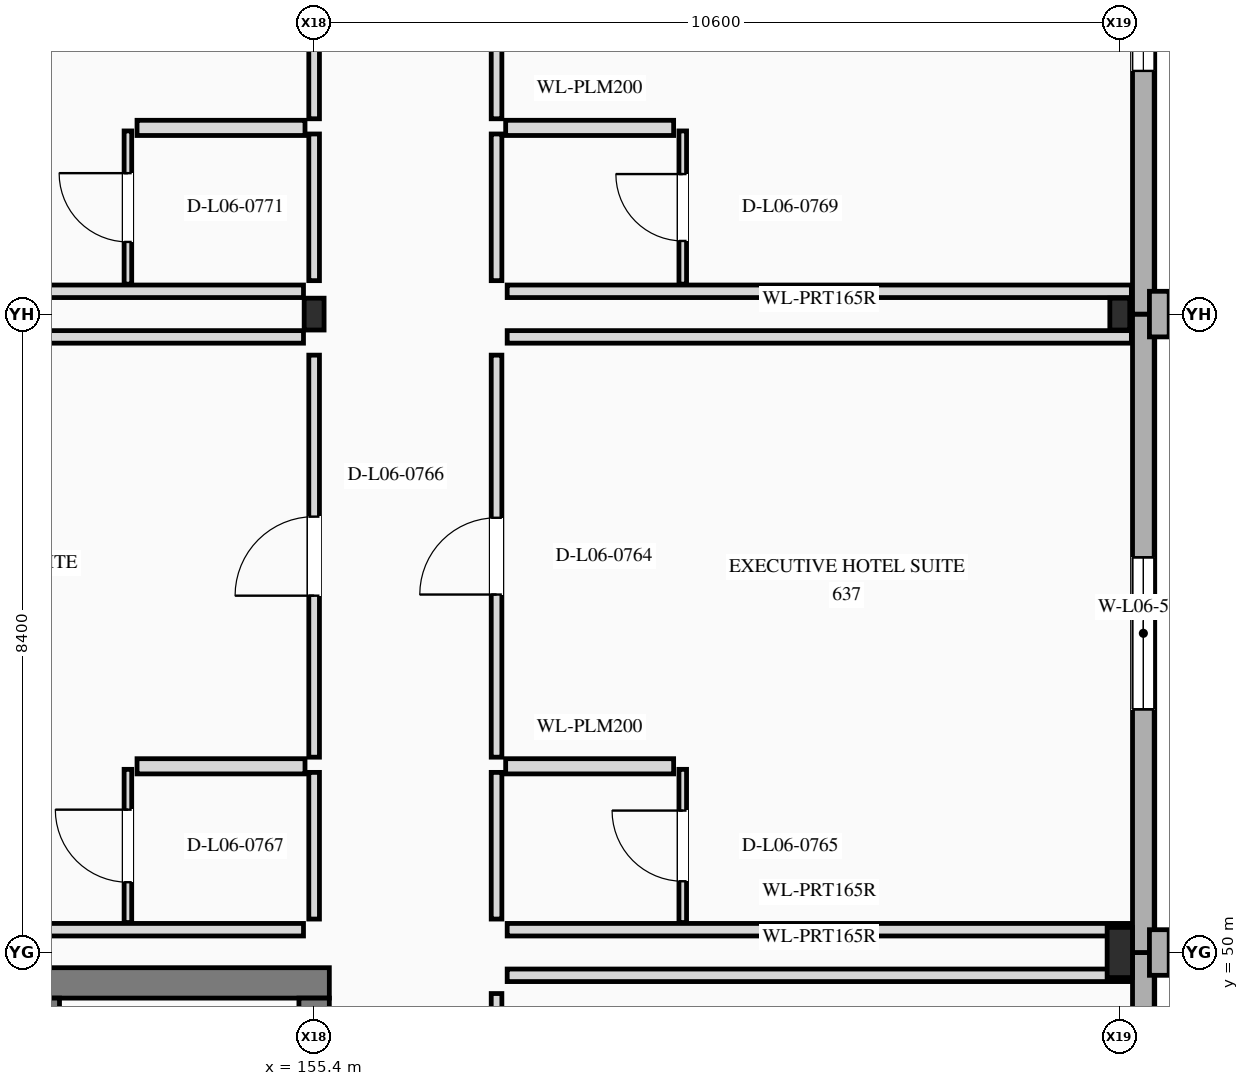
"""IFC4 building model, lengths in metres.
Left out: names, types, materials, properties, quantities, classifications, styles, units other than length and angle.
Written with IfcOpenShell. Run it as: python <this file> out.ifc"""

import sys

from ifc_helpers import new_model, si_unit, direction, frame, frame_2d, origin, origin_2d, place, context, subcontext, project, spatial, rectangle, i_section, extrude, element, fill, save


model = new_model("IFC4")
c1 = context("Model", 3, precision=1e-05, world=origin(), true_north=direction((0.0, 1.0)))
c2 = subcontext(c1, "Body", "Model", "MODEL_VIEW")
j1 = project(units=[si_unit("LENGTHUNIT", "METRE"), si_unit("PLANEANGLEUNIT", "RADIAN")], contexts=[c1])
p1 = place(None, origin())
s1 = spatial("IfcSite", under=j1, at=p1, CompositionType="ELEMENT")
p2 = place(p1, origin())
s2 = spatial("IfcBuilding", under=s1, at=p2, CompositionType="ELEMENT")
p3 = place(p2, frame((0.0, 0.0, 27.0)))
s3 = spatial("IfcBuildingStorey", under=s2, at=p3, CompositionType="ELEMENT", Elevation=27.0)
p4 = place(p3, frame((155.4, 58.4, 0.0), z_axis=(0.0, 0.0, 1.0), x_axis=(1.0, 0.0, 0.0)))
e1 = element("IfcColumn", 1, at=p4, inside=s3, PredefinedType="COLUMN", context=c2, shape_type="SweptSolid", body=[
    extrude(i_section(OverallWidth=0.262, OverallDepth=0.419, WebThickness=0.012, FlangeThickness=0.019, at=origin_2d()), origin(), (0.0, 0.0, 1.0), 3.6),
])
p5 = place(p3, frame((166.0, 50.0, 0.0), z_axis=(0.0, 0.0, 1.0), x_axis=(1.0, 0.0, 0.0)))
e2 = element("IfcColumn", 2, at=p5, inside=s3, PredefinedType="COLUMN", context=c2, shape_type="SweptSolid", body=[
    extrude(i_section(OverallWidth=0.333, OverallDepth=0.66, WebThickness=0.024, FlangeThickness=0.044, at=origin_2d()), origin(), (0.0, 0.0, 1.0), 3.6),
])
p6 = place(p3, frame((166.0, 58.4, 0.0), z_axis=(0.0, 0.0, 1.0), x_axis=(1.0, 0.0, 0.0)))
e3 = element("IfcColumn", 3, at=p6, inside=s3, PredefinedType="COLUMN", context=c2, shape_type="SweptSolid", body=[
    extrude(i_section(OverallWidth=0.262, OverallDepth=0.419, WebThickness=0.012, FlangeThickness=0.019, at=origin_2d()), origin(), (0.0, 0.0, 1.0), 3.6),
])
p7 = place(p3, frame((166.31, 47.86, 0.0), z_axis=(0.0, 0.0, 1.0), x_axis=(0.0, 1.0, 0.0)))
e4 = element("IfcWall", 4, at=p7, inside=s3, PredefinedType="STANDARD", context=c2, shape_type="SweptSolid", body=[
    extrude(rectangle(XDim=2.14, YDim=0.285, at=frame_2d((1.07, 0.0))), origin(), (0.0, 0.0, 1.0), 3.6),
])
p8 = place(p3, frame((166.31, 50.0, 0.0), z_axis=(0.0, 0.0, 1.0), x_axis=(0.0, 1.0, 0.0)))
e5 = element("IfcWall", 5, at=p8, inside=s3, PredefinedType="STANDARD", context=c2, shape_type="SweptSolid", body=[
    extrude(rectangle(XDim=8.4, YDim=0.285, at=frame_2d((4.2, 0.0))), origin(), (0.0, 0.0, 1.0), 3.6),
])
p9 = place(p8, frame((3.2, 0.0, 0.85)))
e6 = element("IfcOpeningElement", 6, at=p9, cuts=e5, PredefinedType="OPENING", context=c2, shape_type="SweptSolid", body=[
    extrude(rectangle(XDim=2.0, YDim=1.65, at=frame_2d((1.0, 0.825))), frame((0.0, 0.152, 0.0), z_axis=(0.0, -1.0, 0.0), x_axis=(1.0, 0.0, 0.0)), (0.0, 0.0, 1.0), 0.305),
])
p10 = place(p3, frame((166.52, 49.7, 0.0), z_axis=(0.0, 0.0, 1.0), x_axis=(0.0, 1.0, 0.0)))
e7 = element("IfcWall", 7, at=p10, inside=s3, PredefinedType="ELEMENTEDWALL", context=c2, shape_type="SweptSolid", body=[
    extrude(rectangle(XDim=0.6, YDim=0.26, at=frame_2d((0.3, 0.0))), origin(), (0.0, 0.0, 1.0), 3.6),
])
p11 = place(p3, frame((166.31, 58.4, 0.0), z_axis=(0.0, 0.0, 1.0), x_axis=(0.0, 1.0, 0.0)))
e8 = element("IfcWall", 8, at=p11, inside=s3, PredefinedType="STANDARD", context=c2, shape_type="SweptSolid", body=[
    extrude(rectangle(XDim=8.71, YDim=0.285, at=frame_2d((4.355, 0.0))), origin(), (0.0, 0.0, 1.0), 3.6),
])
p12 = place(p11, frame((3.2, 0.0, 0.85)))
e9 = element("IfcOpeningElement", 9, at=p12, cuts=e8, PredefinedType="OPENING", context=c2, shape_type="SweptSolid", body=[
    extrude(rectangle(XDim=2.0, YDim=1.65, at=frame_2d((1.0, 0.825))), frame((0.0, 0.152, 0.0), z_axis=(0.0, -1.0, 0.0), x_axis=(1.0, 0.0, 0.0)), (0.0, 0.0, 1.0), 0.305),
])
p13 = place(p3, frame((166.52, 58.1, 0.0), z_axis=(0.0, 0.0, 1.0), x_axis=(0.0, 1.0, 0.0)))
e10 = element("IfcWall", 10, at=p13, inside=s3, PredefinedType="ELEMENTEDWALL", context=c2, shape_type="SweptSolid", body=[
    extrude(rectangle(XDim=0.6, YDim=0.26, at=frame_2d((0.3, 0.0))), origin(), (0.0, 0.0, 1.0), 3.6),
])
p14 = place(p3, frame((155.6, 49.6, 0.0), z_axis=(0.0, 0.0, 1.0), x_axis=(-1.0, 0.0, 0.0)))
e11 = element("IfcWall", 11, at=p14, inside=s3, PredefinedType="SHEAR", context=c2, shape_type="SweptSolid", body=[
    extrude(rectangle(XDim=8.2, YDim=0.4, at=frame_2d((4.1, 0.0))), origin(), (0.0, 0.0, 1.0), 3.6),
])
p15 = place(p3, frame((155.4, 40.0, 0.0), z_axis=(0.0, 0.0, 1.0), x_axis=(0.0, 1.0, 0.0)))
e12 = element("IfcWall", 12, at=p15, inside=s3, PredefinedType="SHEAR", context=c2, shape_type="SweptSolid", body=[
    extrude(rectangle(XDim=9.4, YDim=0.4, at=frame_2d((4.7, 0.0))), origin(), (0.0, 0.0, 1.0), 3.6),
])
p16 = place(p15, frame((1.05, 0.0, 0.0)))
e13 = element("IfcOpeningElement", 13, at=p16, cuts=e12, PredefinedType="OPENING", context=c2, shape_type="SweptSolid", body=[
    extrude(rectangle(XDim=1.1, YDim=2.2, at=frame_2d((0.55, 1.1))), frame((0.0, 0.21, 0.0), z_axis=(0.0, -1.0, 0.0), x_axis=(1.0, 0.0, 0.0)), (0.0, 0.0, 1.0), 0.42),
])
p17 = place(p15, frame((3.95, 0.0, 0.0)))
e14 = element("IfcOpeningElement", 14, at=p17, cuts=e12, PredefinedType="OPENING", context=c2, shape_type="SweptSolid", body=[
    extrude(rectangle(XDim=1.1, YDim=2.2, at=frame_2d((0.55, 1.1))), frame((0.0, 0.21, 0.0), z_axis=(0.0, -1.0, 0.0), x_axis=(1.0, 0.0, 0.0)), (0.0, 0.0, 1.0), 0.42),
])
p18 = place(p15, frame((6.875, 0.0, 0.0)))
e15 = element("IfcOpeningElement", 15, at=p18, cuts=e12, PredefinedType="OPENING", context=c2, shape_type="SweptSolid", body=[
    extrude(rectangle(XDim=1.35, YDim=2.3, at=frame_2d((0.675, 1.15))), frame((0.0, 0.21, 0.0), z_axis=(0.0, -1.0, 0.0), x_axis=(1.0, 0.0, 0.0)), (0.0, 0.0, 1.0), 0.42),
])
p19 = place(p3, frame((151.875, 40.0, 0.0), z_axis=(0.0, 0.0, 1.0), x_axis=(0.0, 1.0, 0.0)))
e16 = element("IfcWall", 16, at=p19, inside=s3, PredefinedType="SHEAR", context=c2, shape_type="SweptSolid", body=[
    extrude(rectangle(XDim=9.4, YDim=0.35, at=frame_2d((4.7, 0.0))), origin(), (0.0, 0.0, 1.0), 3.6),
])
p20 = place(p3, frame((157.8, 44.17, 0.0), z_axis=(0.0, 0.0, 1.0), x_axis=(0.0, 1.0, 0.0)))
e17 = element("IfcWall", 17, at=p20, inside=s3, PredefinedType="PARTITIONING", context=c2, shape_type="SweptSolid", body=[
    extrude(rectangle(XDim=5.29, YDim=0.14, at=frame_2d((2.645, 0.0))), origin(), (0.0, 0.0, 1.0), 3.29),
])
p21 = place(p20, frame((2.155, 0.0, 0.0)))
e18 = element("IfcOpeningElement", 18, at=p21, cuts=e17, PredefinedType="OPENING", context=c2, shape_type="SweptSolid", body=[
    extrude(rectangle(XDim=0.98, YDim=2.35, at=frame_2d((0.49, 1.175))), frame((0.0, 0.08, 0.0), z_axis=(0.0, -1.0, 0.0), x_axis=(1.0, 0.0, 0.0)), (0.0, 0.0, 1.0), 0.16),
])
p22 = place(p3, frame((157.94, 49.7, 0.0), z_axis=(0.0, 0.0, 1.0), x_axis=(1.0, 0.0, 0.0)))
e19 = element("IfcWall", 19, at=p22, inside=s3, PredefinedType="PARTITIONING", context=c2, shape_type="SweptSolid", body=[
    extrude(rectangle(XDim=8.213, YDim=0.165, at=frame_2d((4.106, 0.0))), origin(), (0.0, 0.0, 1.0), 2.68),
])
p23 = place(p3, frame((157.8, 50.44, 0.0), z_axis=(0.0, 0.0, 1.0), x_axis=(0.0, 1.0, 0.0)))
e20 = element("IfcWall", 20, at=p23, inside=s3, PredefinedType="PARTITIONING", context=c2, shape_type="SweptSolid", body=[
    extrude(rectangle(XDim=1.93, YDim=0.14, at=frame_2d((0.965, 0.0))), origin(), (0.0, 0.0, 1.0), 2.843),
])
p24 = place(p3, frame((157.8, 52.57, 0.0), z_axis=(0.0, 0.0, 1.0), x_axis=(0.0, 1.0, 0.0)))
e21 = element("IfcWall", 21, at=p24, inside=s3, PredefinedType="PARTITIONING", context=c2, shape_type="SweptSolid", body=[
    extrude(rectangle(XDim=5.29, YDim=0.14, at=frame_2d((2.645, 0.0))), origin(), (0.0, 0.0, 1.0), 2.843),
])
p25 = place(p24, frame((2.14, 0.0, 0.0)))
e22 = element("IfcOpeningElement", 22, at=p25, cuts=e21, PredefinedType="OPENING", context=c2, shape_type="SweptSolid", body=[
    extrude(rectangle(XDim=1.01, YDim=2.35, at=frame_2d((0.505, 1.175))), frame((0.0, 0.08, 0.0), z_axis=(0.0, -1.0, 0.0), x_axis=(1.0, 0.0, 0.0)), (0.0, 0.0, 1.0), 0.16),
])
for number, where, z_axis, x_axis in (
    (23, (157.94, 50.3, 0.0), (0.0, 0.0, 1.0), (1.0, 0.0, 0.0)),
    (24, (157.94, 58.1, 0.0), (0.0, 0.0, 1.0), (1.0, 0.0, 0.0)),
):
    element("IfcWall", number, at=place(p3, frame(where, z_axis=z_axis, x_axis=x_axis)), inside=s3, PredefinedType="PARTITIONING", context=c2, shape_type="SweptSolid", body=[
        extrude(rectangle(XDim=8.213, YDim=0.165, at=frame_2d((4.106, 0.0))), origin(), (0.0, 0.0, 1.0), 2.68),
    ])
p26 = place(p3, frame((157.92, 52.45, 0.0), z_axis=(0.0, 0.0, 1.0), x_axis=(1.0, 0.0, 0.0)))
e25 = element("IfcWall", 25, at=p26, inside=s3, PredefinedType="PLUMBINGWALL", context=c2, shape_type="SweptSolid", body=[
    extrude(rectangle(XDim=2.21, YDim=0.2, at=frame_2d((1.105, 0.0))), origin(), (0.0, 0.0, 1.0), 3.29),
])
p27 = place(p3, frame((160.25, 50.395, 0.0), z_axis=(0.0, 0.0, 1.0), x_axis=(0.0, 1.0, 0.0)))
e26 = element("IfcWall", 26, at=p27, inside=s3, PredefinedType="PARTITIONING", context=c2, shape_type="SweptSolid", body=[
    extrude(rectangle(XDim=2.015, YDim=0.1, at=frame_2d((1.008, 0.0))), origin(), (0.0, 0.0, 1.0), 2.843),
])
p28 = place(p27, frame((0.543, 0.0, 0.0)))
e27 = element("IfcOpeningElement", 27, at=p28, cuts=e26, PredefinedType="OPENING", context=c2, shape_type="SweptSolid", body=[
    extrude(rectangle(XDim=0.93, YDim=2.14, at=frame_2d((0.465, 1.07))), frame((0.0, 0.06, 0.0), z_axis=(0.0, -1.0, 0.0), x_axis=(1.0, 0.0, 0.0)), (0.0, 0.0, 1.0), 0.12),
])
p29 = place(p3, frame((155.4, 50.44, 0.0), z_axis=(0.0, 0.0, 1.0), x_axis=(0.0, 1.0, 0.0)))
e28 = element("IfcWall", 28, at=p29, inside=s3, PredefinedType="PARTITIONING", context=c2, shape_type="SweptSolid", body=[
    extrude(rectangle(XDim=1.93, YDim=0.14, at=frame_2d((0.965, 0.0))), origin(), (0.0, 0.0, 1.0), 2.68),
])
p30 = place(p3, frame((155.4, 52.57, 0.0), z_axis=(0.0, 0.0, 1.0), x_axis=(0.0, 1.0, 0.0)))
e29 = element("IfcWall", 29, at=p30, inside=s3, PredefinedType="PARTITIONING", context=c2, shape_type="SweptSolid", body=[
    extrude(rectangle(XDim=5.29, YDim=0.14, at=frame_2d((2.645, 0.0))), origin(), (0.0, 0.0, 1.0), 2.68),
])
p31 = place(p30, frame((2.125, 0.0, 0.0)))
e30 = element("IfcOpeningElement", 30, at=p31, cuts=e29, PredefinedType="OPENING", context=c2, shape_type="SweptSolid", body=[
    extrude(rectangle(XDim=1.04, YDim=2.4, at=frame_2d((0.52, 1.2))), frame((0.0, 0.08, 0.0), z_axis=(0.0, -1.0, 0.0), x_axis=(1.0, 0.0, 0.0)), (0.0, 0.0, 1.0), 0.16),
])
p32 = place(p3, frame((147.048, 50.3, 0.0), z_axis=(0.0, 0.0, 1.0), x_axis=(1.0, 0.0, 0.0)))
e31 = element("IfcWall", 31, at=p32, inside=s3, PredefinedType="PARTITIONING", context=c2, shape_type="SweptSolid", body=[
    extrude(rectangle(XDim=8.212, YDim=0.165, at=frame_2d((4.106, 0.0))), origin(), (0.0, 0.0, 1.0), 3.29),
])
p33 = place(p3, frame((147.048, 58.1, 0.0), z_axis=(0.0, 0.0, 1.0), x_axis=(1.0, 0.0, 0.0)))
e32 = element("IfcWall", 32, at=p33, inside=s3, PredefinedType="PARTITIONING", context=c2, shape_type="SweptSolid", body=[
    extrude(rectangle(XDim=8.212, YDim=0.165, at=frame_2d((4.106, 0.0))), origin(), (0.0, 0.0, 1.0), 2.703),
])
p34 = place(p3, frame((153.07, 52.45, 0.0), z_axis=(0.0, 0.0, 1.0), x_axis=(1.0, 0.0, 0.0)))
e33 = element("IfcWall", 33, at=p34, inside=s3, PredefinedType="PLUMBINGWALL", context=c2, shape_type="SweptSolid", body=[
    extrude(rectangle(XDim=2.21, YDim=0.2, at=frame_2d((1.105, 0.0))), origin(), (0.0, 0.0, 1.0), 3.29),
])
p35 = place(p3, frame((152.95, 50.395, 0.0), z_axis=(0.0, 0.0, 1.0), x_axis=(0.0, 1.0, 0.0)))
e34 = element("IfcWall", 34, at=p35, inside=s3, PredefinedType="PARTITIONING", context=c2, shape_type="SweptSolid", body=[
    extrude(rectangle(XDim=2.015, YDim=0.1, at=frame_2d((1.008, 0.0))), origin(), (0.0, 0.0, 1.0), 3.29),
])
p36 = place(p35, frame((0.53, 0.0, 0.0)))
e35 = element("IfcOpeningElement", 35, at=p36, cuts=e34, PredefinedType="OPENING", context=c2, shape_type="SweptSolid", body=[
    extrude(rectangle(XDim=0.955, YDim=2.14, at=frame_2d((0.478, 1.07))), frame((0.0, 0.06, 0.0), z_axis=(0.0, -1.0, 0.0), x_axis=(1.0, 0.0, 0.0)), (0.0, 0.0, 1.0), 0.12),
])
p37 = place(p3, frame((157.8, 58.84, 0.0), z_axis=(0.0, 0.0, 1.0), x_axis=(0.0, 1.0, 0.0)))
e36 = element("IfcWall", 36, at=p37, inside=s3, PredefinedType="PARTITIONING", context=c2, shape_type="SweptSolid", body=[
    extrude(rectangle(XDim=1.93, YDim=0.14, at=frame_2d((0.965, 0.0))), origin(), (0.0, 0.0, 1.0), 2.848),
])
p38 = place(p3, frame((157.8, 60.97, 0.0), z_axis=(0.0, 0.0, 1.0), x_axis=(0.0, 1.0, 0.0)))
e37 = element("IfcWall", 37, at=p38, inside=s3, PredefinedType="PARTITIONING", context=c2, shape_type="SweptSolid", body=[
    extrude(rectangle(XDim=5.982, YDim=0.14, at=frame_2d((2.991, 0.0))), origin(), (0.0, 0.0, 1.0), 2.703),
])
p39 = place(p38, frame((2.456, 0.0, 0.0)))
e38 = element("IfcOpeningElement", 38, at=p39, cuts=e37, PredefinedType="OPENING", context=c2, shape_type="SweptSolid", body=[
    extrude(rectangle(XDim=1.07, YDim=2.4, at=frame_2d((0.535, 1.2))), frame((0.0, 0.08, 0.0), z_axis=(0.0, -1.0, 0.0), x_axis=(1.0, 0.0, 0.0)), (0.0, 0.0, 1.0), 0.16),
])
p40 = place(p3, frame((157.94, 58.7, 0.0), z_axis=(0.0, 0.0, 1.0), x_axis=(1.0, 0.0, 0.0)))
e39 = element("IfcWall", 39, at=p40, inside=s3, PredefinedType="PARTITIONING", context=c2, shape_type="SweptSolid", body=[
    extrude(rectangle(XDim=8.213, YDim=0.165, at=frame_2d((4.106, 0.0))), origin(), (0.0, 0.0, 1.0), 2.68),
])
p41 = place(p3, frame((157.92, 60.85, 0.0), z_axis=(0.0, 0.0, 1.0), x_axis=(1.0, 0.0, 0.0)))
e40 = element("IfcWall", 40, at=p41, inside=s3, PredefinedType="PLUMBINGWALL", context=c2, shape_type="SweptSolid", body=[
    extrude(rectangle(XDim=2.21, YDim=0.2, at=frame_2d((1.105, 0.0))), origin(), (0.0, 0.0, 1.0), 3.29),
])
p42 = place(p3, frame((160.25, 58.794, 0.0), z_axis=(0.0, 0.0, 1.0), x_axis=(0.0, 1.0, 0.0)))
e41 = element("IfcWall", 41, at=p42, inside=s3, PredefinedType="PARTITIONING", context=c2, shape_type="SweptSolid", body=[
    extrude(rectangle(XDim=2.016, YDim=0.1, at=frame_2d((1.008, 0.0))), origin(), (0.0, 0.0, 1.0), 2.848),
])
p43 = place(p42, frame((0.568, 0.0, 0.0)))
e42 = element("IfcOpeningElement", 42, at=p43, cuts=e41, PredefinedType="OPENING", context=c2, shape_type="SweptSolid", body=[
    extrude(rectangle(XDim=0.88, YDim=2.18, at=frame_2d((0.44, 1.09))), frame((0.0, 0.06, 0.0), z_axis=(0.0, -1.0, 0.0), x_axis=(1.0, 0.0, 0.0)), (0.0, 0.0, 1.0), 0.12),
])
p44 = place(p3, frame((155.4, 58.84, 0.0), z_axis=(0.0, 0.0, 1.0), x_axis=(0.0, 1.0, 0.0)))
e43 = element("IfcWall", 43, at=p44, inside=s3, PredefinedType="PARTITIONING", context=c2, shape_type="SweptSolid", body=[
    extrude(rectangle(XDim=1.93, YDim=0.14, at=frame_2d((0.965, 0.0))), origin(), (0.0, 0.0, 1.0), 2.764),
])
p45 = place(p3, frame((155.4, 60.97, 0.0), z_axis=(0.0, 0.0, 1.0), x_axis=(0.0, 1.0, 0.0)))
e44 = element("IfcWall", 44, at=p45, inside=s3, PredefinedType="PARTITIONING", context=c2, shape_type="SweptSolid", body=[
    extrude(rectangle(XDim=5.982, YDim=0.14, at=frame_2d((2.991, 0.0))), origin(), (0.0, 0.0, 1.0), 2.703),
])
p46 = place(p45, frame((2.531, 0.0, 0.0)))
e45 = element("IfcOpeningElement", 45, at=p46, cuts=e44, PredefinedType="OPENING", context=c2, shape_type="SweptSolid", body=[
    extrude(rectangle(XDim=0.92, YDim=2.15, at=frame_2d((0.46, 1.075))), frame((0.0, 0.08, 0.0), z_axis=(0.0, -1.0, 0.0), x_axis=(1.0, 0.0, 0.0)), (0.0, 0.0, 1.0), 0.16),
])
p47 = place(p3, frame((147.048, 58.7, 0.0), z_axis=(0.0, 0.0, 1.0), x_axis=(1.0, 0.0, 0.0)))
e46 = element("IfcWall", 46, at=p47, inside=s3, PredefinedType="PARTITIONING", context=c2, shape_type="SweptSolid", body=[
    extrude(rectangle(XDim=8.212, YDim=0.165, at=frame_2d((4.106, 0.0))), origin(), (0.0, 0.0, 1.0), 2.703),
])
p48 = place(p3, frame((153.07, 60.85, 0.0), z_axis=(0.0, 0.0, 1.0), x_axis=(1.0, 0.0, 0.0)))
e47 = element("IfcWall", 47, at=p48, inside=s3, PredefinedType="PLUMBINGWALL", context=c2, shape_type="SweptSolid", body=[
    extrude(rectangle(XDim=2.21, YDim=0.2, at=frame_2d((1.105, 0.0))), origin(), (0.0, 0.0, 1.0), 3.29),
])
p49 = place(p3, frame((152.95, 58.794, 0.0), z_axis=(0.0, 0.0, 1.0), x_axis=(0.0, 1.0, 0.0)))
e48 = element("IfcWall", 48, at=p49, inside=s3, PredefinedType="PARTITIONING", context=c2, shape_type="SweptSolid", body=[
    extrude(rectangle(XDim=2.016, YDim=0.1, at=frame_2d((1.008, 0.0))), origin(), (0.0, 0.0, 1.0), 2.898),
])
p50 = place(p49, frame((0.555, 0.0, 0.0)))
e49 = element("IfcOpeningElement", 49, at=p50, cuts=e48, PredefinedType="OPENING", context=c2, shape_type="SweptSolid", body=[
    extrude(rectangle(XDim=0.905, YDim=2.18, at=frame_2d((0.453, 1.09))), frame((0.0, 0.06, 0.0), z_axis=(0.0, -1.0, 0.0), x_axis=(1.0, 0.0, 0.0)), (0.0, 0.0, 1.0), 0.12),
])
p51 = place(p9, origin())
e50 = element("IfcWindow", 50, at=p51, inside=s3, PartitioningType="SINGLE_PANEL", PredefinedType="WINDOW", context=c2, shape_type="SweptSolid", body=[
    extrude(rectangle(XDim=2.0, YDim=1.65, at=frame_2d((1.0, 0.825))), frame((0.0, 0.03, 0.0), z_axis=(0.0, -1.0, 0.0), x_axis=(1.0, 0.0, 0.0)), (0.0, 0.0, 1.0), 0.06),
])
fill(e6, e50)
p52 = place(p12, origin())
e51 = element("IfcWindow", 51, at=p52, inside=s3, PartitioningType="SINGLE_PANEL", PredefinedType="WINDOW", context=c2, shape_type="SweptSolid", body=[
    extrude(rectangle(XDim=2.0, YDim=1.65, at=frame_2d((1.0, 0.825))), frame((0.0, 0.03, 0.0), z_axis=(0.0, -1.0, 0.0), x_axis=(1.0, 0.0, 0.0)), (0.0, 0.0, 1.0), 0.06),
])
fill(e9, e51)
p53 = place(p25, origin())
e52 = element("IfcDoor", 52, at=p53, inside=s3, OperationType="SINGLE_SWING_LEFT", PredefinedType="DOOR", context=c2, shape_type="SweptSolid", body=[
    extrude(rectangle(XDim=1.01, YDim=2.35, at=frame_2d((0.505, 1.175))), frame((0.0, 0.025, 0.0), z_axis=(0.0, -1.0, 0.0), x_axis=(1.0, 0.0, 0.0)), (0.0, 0.0, 1.0), 0.05),
])
fill(e22, e52)
p54 = place(p28, origin())
e53 = element("IfcDoor", 53, at=p54, inside=s3, OperationType="SINGLE_SWING_RIGHT", PredefinedType="DOOR", context=c2, shape_type="SweptSolid", body=[
    extrude(rectangle(XDim=0.93, YDim=2.14, at=frame_2d((0.465, 1.07))), frame((0.0, 0.025, 0.0), z_axis=(0.0, -1.0, 0.0), x_axis=(1.0, 0.0, 0.0)), (0.0, 0.0, 1.0), 0.05),
])
fill(e27, e53)
p55 = place(p31, origin())
e54 = element("IfcDoor", 54, at=p55, inside=s3, OperationType="SINGLE_SWING_LEFT", PredefinedType="DOOR", context=c2, shape_type="SweptSolid", body=[
    extrude(rectangle(XDim=1.04, YDim=2.4, at=frame_2d((0.52, 1.2))), frame((0.0, 0.025, 0.0), z_axis=(0.0, -1.0, 0.0), x_axis=(1.0, 0.0, 0.0)), (0.0, 0.0, 1.0), 0.05),
])
fill(e30, e54)
p56 = place(p36, origin())
e55 = element("IfcDoor", 55, at=p56, inside=s3, OperationType="SINGLE_SWING_RIGHT", PredefinedType="DOOR", context=c2, shape_type="SweptSolid", body=[
    extrude(rectangle(XDim=0.955, YDim=2.14, at=frame_2d((0.478, 1.07))), frame((0.0, 0.025, 0.0), z_axis=(0.0, -1.0, 0.0), x_axis=(1.0, 0.0, 0.0)), (0.0, 0.0, 1.0), 0.05),
])
fill(e35, e55)
p57 = place(p43, origin())
e56 = element("IfcDoor", 56, at=p57, inside=s3, OperationType="SINGLE_SWING_RIGHT", PredefinedType="DOOR", context=c2, shape_type="SweptSolid", body=[
    extrude(rectangle(XDim=0.88, YDim=2.18, at=frame_2d((0.44, 1.09))), frame((0.0, 0.025, 0.0), z_axis=(0.0, -1.0, 0.0), x_axis=(1.0, 0.0, 0.0)), (0.0, 0.0, 1.0), 0.05),
])
fill(e42, e56)
p58 = place(p50, origin())
e57 = element("IfcDoor", 57, at=p58, inside=s3, OperationType="SINGLE_SWING_RIGHT", PredefinedType="DOOR", context=c2, shape_type="SweptSolid", body=[
    extrude(rectangle(XDim=0.905, YDim=2.18, at=frame_2d((0.453, 1.09))), frame((0.0, 0.025, 0.0), z_axis=(0.0, -1.0, 0.0), x_axis=(1.0, 0.0, 0.0)), (0.0, 0.0, 1.0), 0.05),
])
fill(e49, e57)
save(model, sys.argv[1])
